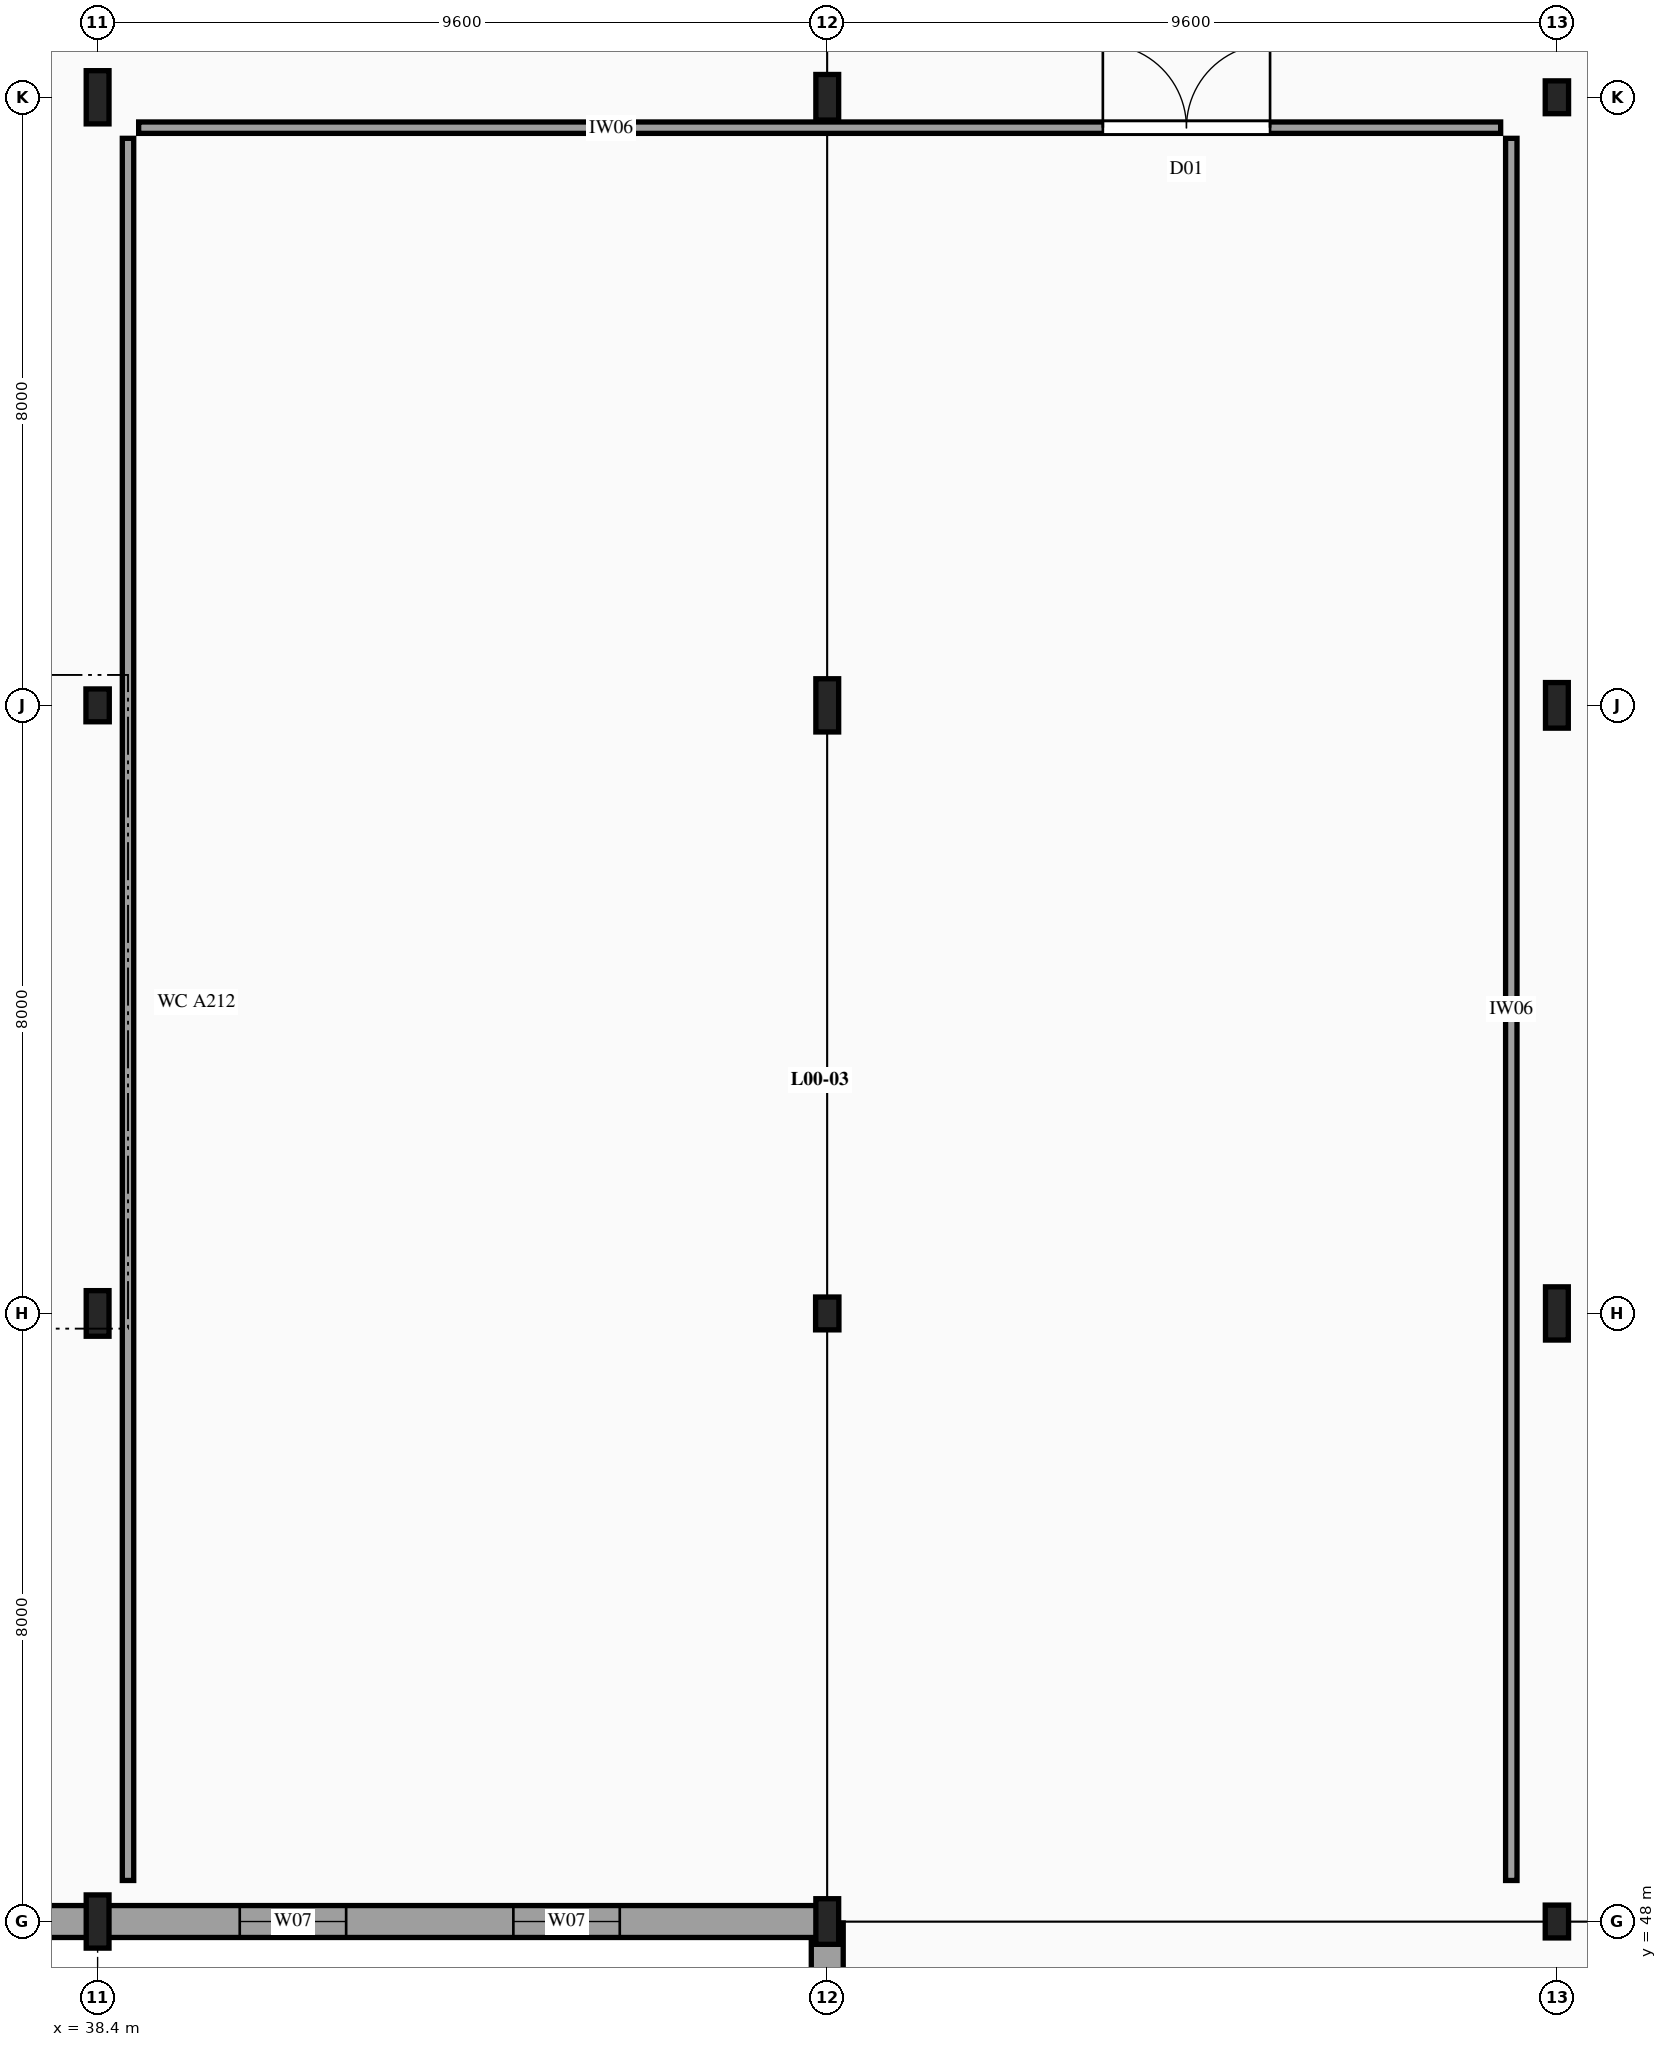
"""IFC4 building model, lengths in metres.
Left out: names, types, materials, properties, quantities, classifications, styles, units other than length and angle.
Written with IfcOpenShell. Run it as: python <this file> out.ifc"""

import sys

from ifc_helpers import new_model, si_unit, direction, frame, frame_2d, origin, origin_2d, place, context, subcontext, project, spatial, rectangle, i_section, extrude, element, fill, save


model = new_model("IFC4")
c1 = context("Model", 3, precision=1e-05, world=origin(), true_north=direction((0.0, 1.0)))
c2 = subcontext(c1, "Body", "Model", "MODEL_VIEW")
j1 = project(units=[si_unit("LENGTHUNIT", "METRE"), si_unit("PLANEANGLEUNIT", "RADIAN")], contexts=[c1])
p1 = place(None, origin())
s1 = spatial("IfcSite", under=j1, at=p1, CompositionType="ELEMENT")
p2 = place(p1, origin())
s2 = spatial("IfcBuilding", under=s1, at=p2, CompositionType="ELEMENT")
p3 = place(p2, origin())
s3 = spatial("IfcBuildingStorey", under=s2, at=p3, CompositionType="ELEMENT", Elevation=0.0)
p4 = place(p3, frame((38.4, 48.0, -0.28), z_axis=(0.0, 0.0, 1.0), x_axis=(1.0, 0.0, 0.0)))
e1 = element("IfcColumn", 1, at=p4, inside=s3, PredefinedType="COLUMN", context=c2, shape_type="SweptSolid", body=[
    extrude(i_section(OverallWidth=0.3, OverallDepth=0.7, WebThickness=0.017, FlangeThickness=0.032, FilletRadius=0.027, at=origin_2d()), origin(), (0.0, 0.0, 1.0), 4.52),
])
p5 = place(p3, frame((38.4, 56.0, -0.28), z_axis=(0.0, 0.0, 1.0), x_axis=(1.0, 0.0, 0.0)))
e2 = element("IfcColumn", 2, at=p5, inside=s3, PredefinedType="COLUMN", context=c2, shape_type="SweptSolid", body=[
    extrude(i_section(OverallWidth=0.3, OverallDepth=0.6, WebThickness=0.015, FlangeThickness=0.03, FilletRadius=0.027, at=origin_2d()), origin(), (0.0, 0.0, 1.0), 4.52),
])
p6 = place(p3, frame((38.4, 64.0, -0.28), z_axis=(0.0, 0.0, 1.0), x_axis=(1.0, 0.0, 0.0)))
e3 = element("IfcColumn", 3, at=p6, inside=s3, PredefinedType="COLUMN", context=c2, shape_type="SweptSolid", body=[
    extrude(i_section(OverallWidth=0.307, OverallDepth=0.432, WebThickness=0.021, FlangeThickness=0.04, FilletRadius=0.027, at=origin_2d()), origin(), (0.0, 0.0, 1.0), 4.52),
])
p7 = place(p3, frame((38.4, 72.0, -0.28), z_axis=(0.0, 0.0, 1.0), x_axis=(1.0, 0.0, 0.0)))
e4 = element("IfcColumn", 4, at=p7, inside=s3, PredefinedType="COLUMN", context=c2, shape_type="SweptSolid", body=[
    extrude(i_section(OverallWidth=0.3, OverallDepth=0.7, WebThickness=0.017, FlangeThickness=0.032, FilletRadius=0.027, at=origin_2d()), origin(), (0.0, 0.0, 1.0), 4.52),
])
p8 = place(p3, frame((48.0, 48.0, -0.28), z_axis=(0.0, 0.0, 1.0), x_axis=(1.0, 0.0, 0.0)))
e5 = element("IfcColumn", 5, at=p8, inside=s3, PredefinedType="COLUMN", context=c2, shape_type="SweptSolid", body=[
    extrude(i_section(OverallWidth=0.3, OverallDepth=0.6, WebThickness=0.015, FlangeThickness=0.03, FilletRadius=0.027, at=origin_2d()), origin(), (0.0, 0.0, 1.0), 4.52),
])
p9 = place(p3, frame((48.0, 56.0, -0.28), z_axis=(0.0, 0.0, 1.0), x_axis=(1.0, 0.0, 0.0)))
e6 = element("IfcColumn", 6, at=p9, inside=s3, PredefinedType="COLUMN", context=c2, shape_type="SweptSolid", body=[
    extrude(i_section(OverallWidth=0.307, OverallDepth=0.432, WebThickness=0.021, FlangeThickness=0.04, FilletRadius=0.027, at=origin_2d()), origin(), (0.0, 0.0, 1.0), 4.52),
])
p10 = place(p3, frame((48.0, 64.0, -0.28), z_axis=(0.0, 0.0, 1.0), x_axis=(1.0, 0.0, 0.0)))
e7 = element("IfcColumn", 7, at=p10, inside=s3, PredefinedType="COLUMN", context=c2, shape_type="SweptSolid", body=[
    extrude(i_section(OverallWidth=0.3, OverallDepth=0.7, WebThickness=0.017, FlangeThickness=0.032, FilletRadius=0.027, at=origin_2d()), origin(), (0.0, 0.0, 1.0), 4.52),
])
p11 = place(p3, frame((48.0, 72.0, -0.28), z_axis=(0.0, 0.0, 1.0), x_axis=(1.0, 0.0, 0.0)))
e8 = element("IfcColumn", 8, at=p11, inside=s3, PredefinedType="COLUMN", context=c2, shape_type="SweptSolid", body=[
    extrude(i_section(OverallWidth=0.3, OverallDepth=0.6, WebThickness=0.015, FlangeThickness=0.03, FilletRadius=0.027, at=origin_2d()), origin(), (0.0, 0.0, 1.0), 4.52),
])
p12 = place(p3, frame((57.6, 48.0, -0.28), z_axis=(0.0, 0.0, 1.0), x_axis=(1.0, 0.0, 0.0)))
e9 = element("IfcColumn", 9, at=p12, inside=s3, PredefinedType="COLUMN", context=c2, shape_type="SweptSolid", body=[
    extrude(i_section(OverallWidth=0.307, OverallDepth=0.432, WebThickness=0.021, FlangeThickness=0.04, FilletRadius=0.027, at=origin_2d()), origin(), (0.0, 0.0, 1.0), 4.52),
])
p13 = place(p3, frame((57.6, 56.0, -0.28), z_axis=(0.0, 0.0, 1.0), x_axis=(1.0, 0.0, 0.0)))
e10 = element("IfcColumn", 10, at=p13, inside=s3, PredefinedType="COLUMN", context=c2, shape_type="SweptSolid", body=[
    extrude(i_section(OverallWidth=0.3, OverallDepth=0.7, WebThickness=0.017, FlangeThickness=0.032, FilletRadius=0.027, at=origin_2d()), origin(), (0.0, 0.0, 1.0), 4.52),
])
p14 = place(p3, frame((57.6, 64.0, -0.28), z_axis=(0.0, 0.0, 1.0), x_axis=(1.0, 0.0, 0.0)))
e11 = element("IfcColumn", 11, at=p14, inside=s3, PredefinedType="COLUMN", context=c2, shape_type="SweptSolid", body=[
    extrude(i_section(OverallWidth=0.3, OverallDepth=0.6, WebThickness=0.015, FlangeThickness=0.03, FilletRadius=0.027, at=origin_2d()), origin(), (0.0, 0.0, 1.0), 4.52),
])
p15 = place(p3, frame((57.6, 72.0, -0.28), z_axis=(0.0, 0.0, 1.0), x_axis=(1.0, 0.0, 0.0)))
e12 = element("IfcColumn", 12, at=p15, inside=s3, PredefinedType="COLUMN", context=c2, shape_type="SweptSolid", body=[
    extrude(i_section(OverallWidth=0.307, OverallDepth=0.432, WebThickness=0.021, FlangeThickness=0.04, FilletRadius=0.027, at=origin_2d()), origin(), (0.0, 0.0, 1.0), 4.52),
])
p16 = place(p3, frame((48.0, 40.02, 0.0), z_axis=(0.0, 0.0, 1.0), x_axis=(0.0, 1.0, 0.0)))
e13 = element("IfcWall", 13, at=p16, inside=s3, PredefinedType="SOLIDWALL", context=c2, shape_type="SweptSolid", body=[
    extrude(rectangle(XDim=7.96, YDim=0.42, at=frame_2d((3.98, 0.0))), origin(), (0.0, 0.0, 1.0), 3.56),
])
p17 = place(p16, frame((2.85, 0.0, 0.8)))
e14 = element("IfcOpeningElement", 14, at=p17, cuts=e13, PredefinedType="OPENING", context=c2, shape_type="SweptSolid", body=[
    extrude(rectangle(XDim=1.6, YDim=2.4, at=frame_2d((0.8, 1.2))), frame((0.0, 0.22, 0.0), z_axis=(0.0, -1.0, 0.0), x_axis=(1.0, 0.0, 0.0)), (0.0, 0.0, 1.0), 0.44),
])
p18 = place(p3, frame((28.82, 48.0, 0.0), z_axis=(0.0, 0.0, 1.0), x_axis=(1.0, 0.0, 0.0)))
e15 = element("IfcWall", 15, at=p18, inside=s3, PredefinedType="SOLIDWALL", context=c2, shape_type="SweptSolid", body=[
    extrude(rectangle(XDim=9.56, YDim=0.42, at=frame_2d((4.78, 0.0))), origin(), (0.0, 0.0, 1.0), 3.56),
])
p19 = place(p18, frame((3.3, 0.0, 0.0)))
e16 = element("IfcOpeningElement", 16, at=p19, cuts=e15, PredefinedType="OPENING", context=c2, shape_type="SweptSolid", body=[
    extrude(rectangle(XDim=2.3, YDim=2.4, at=frame_2d((1.15, 1.2))), frame((0.0, 0.22, 0.0), z_axis=(0.0, -1.0, 0.0), x_axis=(1.0, 0.0, 0.0)), (0.0, 0.0, 1.0), 0.44),
])
p20 = place(p3, frame((38.42, 48.0, 0.0), z_axis=(0.0, 0.0, 1.0), x_axis=(1.0, 0.0, 0.0)))
e17 = element("IfcWall", 17, at=p20, inside=s3, PredefinedType="SOLIDWALL", context=c2, shape_type="SweptSolid", body=[
    extrude(rectangle(XDim=9.56, YDim=0.42, at=frame_2d((4.78, 0.0))), origin(), (0.0, 0.0, 1.0), 3.56),
])
p21 = place(p20, frame((1.85, 0.0, 0.85)))
e18 = element("IfcOpeningElement", 18, at=p21, cuts=e17, PredefinedType="OPENING", context=c2, shape_type="SweptSolid", body=[
    extrude(rectangle(XDim=1.4, YDim=2.4, at=frame_2d((0.7, 1.2))), frame((0.0, 0.22, 0.0), z_axis=(0.0, -1.0, 0.0), x_axis=(1.0, 0.0, 0.0)), (0.0, 0.0, 1.0), 0.44),
])
p22 = place(p20, frame((5.45, 0.0, 0.85)))
e19 = element("IfcOpeningElement", 19, at=p22, cuts=e17, PredefinedType="OPENING", context=c2, shape_type="SweptSolid", body=[
    extrude(rectangle(XDim=1.4, YDim=2.4, at=frame_2d((0.7, 1.2))), frame((0.0, 0.22, 0.0), z_axis=(0.0, -1.0, 0.0), x_axis=(1.0, 0.0, 0.0)), (0.0, 0.0, 1.0), 0.44),
])
p23 = place(p3, frame((38.94, 71.6, 0.0), z_axis=(0.0, 0.0, 1.0), x_axis=(1.0, 0.0, 0.0)))
e20 = element("IfcWall", 20, at=p23, inside=s3, PredefinedType="PARTITIONING", context=c2, shape_type="SweptSolid", body=[
    extrude(rectangle(XDim=17.92, YDim=0.15, at=frame_2d((8.96, 0.0))), origin(), (0.0, 0.0, 1.0), 3.6),
])
p24 = place(p23, frame((12.686, 0.0, 0.0)))
e21 = element("IfcOpeningElement", 21, at=p24, cuts=e20, PredefinedType="OPENING", context=c2, shape_type="SweptSolid", body=[
    extrude(rectangle(XDim=2.2, YDim=2.7, at=frame_2d((1.1, 1.35))), frame((0.0, 0.085, 0.0), z_axis=(0.0, -1.0, 0.0), x_axis=(1.0, 0.0, 0.0)), (0.0, 0.0, 1.0), 0.17),
])
for number, where, z_axis, x_axis in (
    (22, (38.8, 48.54, 0.0), (0.0, 0.0, 1.0), (0.0, 1.0, 0.0)),
    (23, (57.0, 48.54, 0.0), (0.0, 0.0, 1.0), (0.0, 1.0, 0.0)),
):
    element("IfcWall", number, at=place(p3, frame(where, z_axis=z_axis, x_axis=x_axis)), inside=s3, PredefinedType="PARTITIONING", context=c2, shape_type="SweptSolid", body=[
        extrude(rectangle(XDim=22.92, YDim=0.15, at=frame_2d((11.46, 0.0))), origin(), (0.0, 0.0, 1.0), 3.6),
    ])
p25 = place(p21, origin())
e24 = element("IfcWindow", 24, at=p25, inside=s3, PartitioningType="SINGLE_PANEL", PredefinedType="WINDOW", context=c2, shape_type="SweptSolid", body=[
    extrude(rectangle(XDim=1.4, YDim=2.4, at=frame_2d((0.7, 1.2))), frame((0.0, 0.03, 0.0), z_axis=(0.0, -1.0, 0.0), x_axis=(1.0, 0.0, 0.0)), (0.0, 0.0, 1.0), 0.06),
])
fill(e18, e24)
p26 = place(p22, origin())
e25 = element("IfcWindow", 25, at=p26, inside=s3, PartitioningType="SINGLE_PANEL", PredefinedType="WINDOW", context=c2, shape_type="SweptSolid", body=[
    extrude(rectangle(XDim=1.4, YDim=2.4, at=frame_2d((0.7, 1.2))), frame((0.0, 0.03, 0.0), z_axis=(0.0, -1.0, 0.0), x_axis=(1.0, 0.0, 0.0)), (0.0, 0.0, 1.0), 0.06),
])
fill(e19, e25)
p27 = place(p24, origin())
e26 = element("IfcDoor", 26, at=p27, inside=s3, OperationType="DOUBLE_DOOR_SINGLE_SWING", PredefinedType="DOOR", context=c2, shape_type="SweptSolid", body=[
    extrude(rectangle(XDim=2.2, YDim=2.7, at=frame_2d((1.1, 1.35))), frame((0.0, 0.025, 0.0), z_axis=(0.0, -1.0, 0.0), x_axis=(1.0, 0.0, 0.0)), (0.0, 0.0, 1.0), 0.05),
])
fill(e21, e26)
save(model, sys.argv[1])
